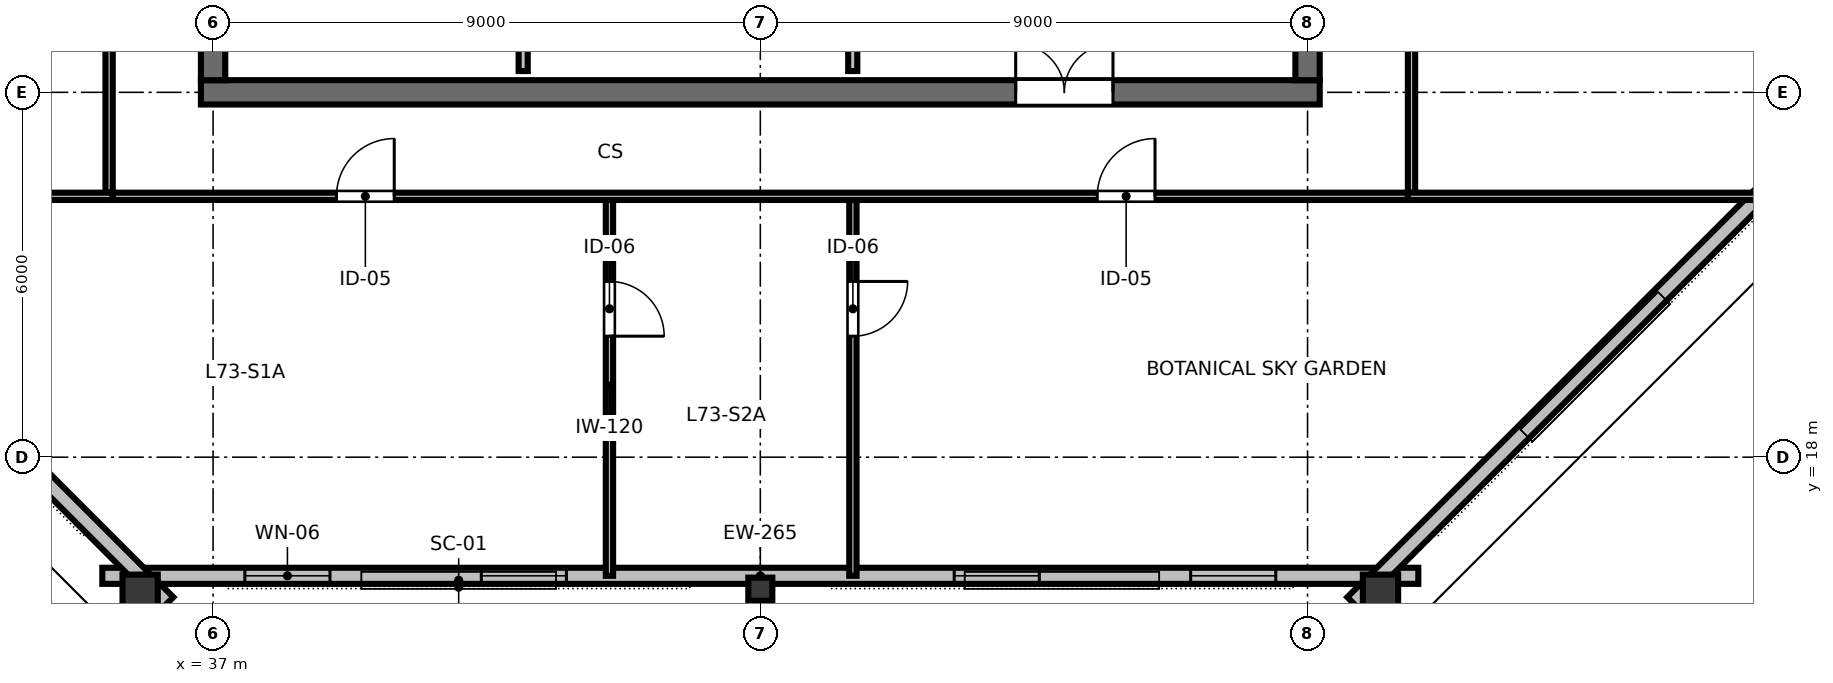
"""IFC4 building model, lengths in metres.
Left out: names, types, materials, properties, quantities, classifications, styles, units other than length and angle.
Written with IfcOpenShell. Run it as: python <this file> out.ifc"""

import sys

from ifc_helpers import new_model, si_unit, direction, frame, frame_2d, origin, origin_2d, place, context, subcontext, project, spatial, rectangle, hollow_rectangle, i_section, extrude, element, fill, save


model = new_model("IFC4")
c1 = context("Model", 3, precision=1e-05, world=origin(), true_north=direction((0.0, 1.0)))
c2 = subcontext(c1, "Body", "Model", "MODEL_VIEW")
j1 = project(units=[si_unit("LENGTHUNIT", "METRE"), si_unit("PLANEANGLEUNIT", "RADIAN")], contexts=[c1])
p1 = place(None, origin())
s1 = spatial("IfcSite", under=j1, at=p1, CompositionType="ELEMENT")
p2 = place(p1, origin())
s2 = spatial("IfcBuilding", under=s1, at=p2, CompositionType="ELEMENT")
p3 = place(p2, frame((0.0, 0.0, 275.4)))
s3 = spatial("IfcBuildingStorey", under=s2, at=p3, CompositionType="ELEMENT", Elevation=275.4)
p4 = place(p3, frame((36.8, 24.0, 0.0), z_axis=(0.0, 0.0, 1.0), x_axis=(1.0, 0.0, 0.0)))
e1 = element("IfcWall", 1, at=p4, inside=s3, PredefinedType="SHEAR", context=c2, shape_type="SweptSolid", body=[
    extrude(rectangle(XDim=18.4, YDim=0.4, at=frame_2d((9.2, 0.0))), origin(), (0.0, 0.0, 1.0), 3.28),
])
p5 = place(p4, frame((13.4, 0.0, 0.0)))
e2 = element("IfcOpeningElement", 2, at=p5, cuts=e1, PredefinedType="OPENING", context=c2, shape_type="SweptSolid", body=[
    extrude(rectangle(XDim=1.6, YDim=2.15, at=frame_2d((0.8, 1.075))), frame((0.0, 0.21, 0.0), z_axis=(0.0, -1.0, 0.0), x_axis=(1.0, 0.0, 0.0)), (0.0, 0.0, 1.0), 0.42),
])
p6 = place(p3, frame((37.0, 24.2, 0.0), z_axis=(0.0, 0.0, 1.0), x_axis=(0.0, 1.0, 0.0)))
e3 = element("IfcWall", 3, at=p6, inside=s3, PredefinedType="SHEAR", context=c2, shape_type="SweptSolid", body=[
    extrude(rectangle(XDim=15.6, YDim=0.4, at=frame_2d((7.8, 0.0))), origin(), (0.0, 0.0, 1.0), 3.28),
])
p7 = place(p6, frame((5.325, 0.0, 0.0)))
e4 = element("IfcOpeningElement", 4, at=p7, cuts=e3, PredefinedType="OPENING", context=c2, shape_type="SweptSolid", body=[
    extrude(rectangle(XDim=1.15, YDim=2.15, at=frame_2d((0.575, 1.075))), frame((0.0, 0.21, 0.0), z_axis=(0.0, -1.0, 0.0), x_axis=(1.0, 0.0, 0.0)), (0.0, 0.0, 1.0), 0.42),
])
p8 = place(p3, frame((55.0, 24.2, 0.0), z_axis=(0.0, 0.0, 1.0), x_axis=(0.0, 1.0, 0.0)))
e5 = element("IfcWall", 5, at=p8, inside=s3, PredefinedType="SHEAR", context=c2, shape_type="SweptSolid", body=[
    extrude(rectangle(XDim=15.6, YDim=0.4, at=frame_2d((7.8, 0.0))), origin(), (0.0, 0.0, 1.0), 3.28),
])
p9 = place(p8, frame((5.325, 0.0, 0.0)))
e6 = element("IfcOpeningElement", 6, at=p9, cuts=e5, PredefinedType="OPENING", context=c2, shape_type="SweptSolid", body=[
    extrude(rectangle(XDim=1.15, YDim=2.15, at=frame_2d((0.575, 1.075))), frame((0.0, 0.21, 0.0), z_axis=(0.0, -1.0, 0.0), x_axis=(1.0, 0.0, 0.0)), (0.0, 0.0, 1.0), 0.42),
])
p10 = place(p3, frame((35.8, 15.719, 0.0), z_axis=(0.143355432569, 0.089514056813, 0.985614759217), x_axis=(-0.529645364944, 0.848219185938, 0.0)))
e7 = element("IfcColumn", 7, at=p10, inside=s3, PredefinedType="COLUMN", context=c2, shape_type="SweptSolid", body=[
    extrude(hollow_rectangle(XDim=0.58, YDim=0.7, WallThickness=0.032, at=origin_2d()), origin(), (0.0, 0.0, 1.0), 3.306),
])
p11 = place(p3, frame((46.0, 15.829, 0.0), z_axis=(0.0, 0.088967639141, 0.996034517065), x_axis=(-1.0, 0.0, 0.0)))
e8 = element("IfcColumn", 8, at=p11, inside=s3, PredefinedType="COLUMN", context=c2, shape_type="SweptSolid", body=[
    extrude(i_section(OverallWidth=0.395, OverallDepth=0.38, WebThickness=0.019, FlangeThickness=0.03, FilletRadius=0.025, at=origin_2d()), origin(), (0.0, 0.0, 1.0), 3.271),
])
p12 = place(p3, frame((56.2, 15.719, 0.0), z_axis=(-0.143355432569, 0.089514056813, 0.985614759217), x_axis=(-0.529645364944, -0.848219185938, 0.0)))
e9 = element("IfcColumn", 9, at=p12, inside=s3, PredefinedType="COLUMN", context=c2, shape_type="SweptSolid", body=[
    extrude(hollow_rectangle(XDim=0.58, YDim=0.7, WallThickness=0.032, at=origin_2d()), origin(), (0.0, 0.0, 1.0), 3.306),
])
p13 = place(p3, frame((35.178, 16.049, 0.0), z_axis=(0.0, 0.0, 1.0), x_axis=(1.0, 0.0, 0.0)))
e10 = element("IfcWall", 10, at=p13, inside=s3, PredefinedType="STANDARD", context=c2, shape_type="SweptSolid", body=[
    extrude(rectangle(XDim=21.644, YDim=0.265, at=frame_2d((10.822, 0.0))), origin(), (0.0, 0.0, 1.0), 2.717),
])
p14 = place(p13, frame((2.344, 0.0, 0.85)))
e11 = element("IfcOpeningElement", 11, at=p14, cuts=e10, PredefinedType="OPENING", context=c2, shape_type="SweptSolid", body=[
    extrude(rectangle(XDim=1.4, YDim=1.2, at=frame_2d((0.7, 0.6))), frame((0.0, 0.142, 0.0), z_axis=(0.0, -1.0, 0.0), x_axis=(1.0, 0.0, 0.0)), (0.0, 0.0, 1.0), 0.285),
])
p15 = place(p13, frame((6.233, 0.0, 0.85)))
e12 = element("IfcOpeningElement", 12, at=p15, cuts=e10, PredefinedType="OPENING", context=c2, shape_type="SweptSolid", body=[
    extrude(rectangle(XDim=1.4, YDim=1.2, at=frame_2d((0.7, 0.6))), frame((0.0, 0.142, 0.0), z_axis=(0.0, -1.0, 0.0), x_axis=(1.0, 0.0, 0.0)), (0.0, 0.0, 1.0), 0.285),
])
p16 = place(p13, frame((14.01, 0.0, 0.85)))
e13 = element("IfcOpeningElement", 13, at=p16, cuts=e10, PredefinedType="OPENING", context=c2, shape_type="SweptSolid", body=[
    extrude(rectangle(XDim=1.4, YDim=1.2, at=frame_2d((0.7, 0.6))), frame((0.0, 0.142, 0.0), z_axis=(0.0, -1.0, 0.0), x_axis=(1.0, 0.0, 0.0)), (0.0, 0.0, 1.0), 0.285),
])
p17 = place(p13, frame((17.899, 0.0, 0.85)))
e14 = element("IfcOpeningElement", 14, at=p17, cuts=e10, PredefinedType="OPENING", context=c2, shape_type="SweptSolid", body=[
    extrude(rectangle(XDim=1.4, YDim=1.2, at=frame_2d((0.7, 0.6))), frame((0.0, 0.142, 0.0), z_axis=(0.0, -1.0, 0.0), x_axis=(1.0, 0.0, 0.0)), (0.0, 0.0, 1.0), 0.285),
])
for number, where, z_axis, x_axis in (
    (15, (55.747, 15.604, 0.0), (0.0, 0.0, 1.0), (0.707, 0.707, 0.0)),
    (16, (28.386, 23.471, 0.0), (0.0, 0.0, 1.0), (0.707, -0.707, 0.0)),
):
    element("IfcWall", number, at=place(p3, frame(where, z_axis=z_axis, x_axis=x_axis)), inside=s3, PredefinedType="STANDARD", context=c2, shape_type="SweptSolid", body=[
        extrude(rectangle(XDim=11.125, YDim=0.265, at=frame_2d((5.562, 0.0))), origin(), (0.0, 0.0, 1.0), 2.717),
    ])
p18 = place(p3, frame((42.1, 24.35, 0.0), z_axis=(0.0, 0.0, 1.0), x_axis=(0.0, 1.0, 0.0)))
e17 = element("IfcWall", 17, at=p18, inside=s3, PredefinedType="PARTITIONING", context=c2, shape_type="SweptSolid", body=[
    extrude(rectangle(XDim=3.9, YDim=0.15, at=frame_2d((1.95, 0.0))), origin(), (0.0, 0.0, 1.0), 3.26),
])
p19 = place(p18, frame((1.5, 0.0, 0.0)))
e18 = element("IfcOpeningElement", 18, at=p19, cuts=e17, PredefinedType="OPENING", context=c2, shape_type="SweptSolid", body=[
    extrude(rectangle(XDim=0.9, YDim=2.15, at=frame_2d((0.45, 1.075))), frame((0.0, 0.085, 0.0), z_axis=(0.0, -1.0, 0.0), x_axis=(1.0, 0.0, 0.0)), (0.0, 0.0, 1.0), 0.17),
])
p20 = place(p3, frame((47.52, 24.35, 0.0), z_axis=(0.0, 0.0, 1.0), x_axis=(0.0, 1.0, 0.0)))
e19 = element("IfcWall", 19, at=p20, inside=s3, PredefinedType="PARTITIONING", context=c2, shape_type="SweptSolid", body=[
    extrude(rectangle(XDim=3.9, YDim=0.15, at=frame_2d((1.95, 0.0))), origin(), (0.0, 0.0, 1.0), 3.26),
])
p21 = place(p20, frame((0.35, 0.0, 0.0)))
e20 = element("IfcOpeningElement", 20, at=p21, cuts=e19, PredefinedType="OPENING", context=c2, shape_type="SweptSolid", body=[
    extrude(rectangle(XDim=0.9, YDim=2.15, at=frame_2d((0.45, 1.075))), frame((0.0, 0.085, 0.0), z_axis=(0.0, -1.0, 0.0), x_axis=(1.0, 0.0, 0.0)), (0.0, 0.0, 1.0), 0.17),
])
p22 = place(p3, frame((43.519, 22.29, 0.0), z_axis=(0.0, 0.0, 1.0), x_axis=(0.0, -1.0, 0.0)))
e21 = element("IfcWall", 21, at=p22, inside=s3, PredefinedType="PARTITIONING", context=c2, shape_type="SweptSolid", body=[
    extrude(rectangle(XDim=6.241, YDim=0.12, at=frame_2d((3.121, 0.0))), origin(), (0.0, 0.0, 1.0), 2.54),
])
p23 = place(p22, frame((1.4, 0.0, 0.0)))
e22 = element("IfcOpeningElement", 22, at=p23, cuts=e21, PredefinedType="OPENING", context=c2, shape_type="SweptSolid", body=[
    extrude(rectangle(XDim=0.9, YDim=2.15, at=frame_2d((0.45, 1.075))), frame((0.0, 0.07, 0.0), z_axis=(0.0, -1.0, 0.0), x_axis=(1.0, 0.0, 0.0)), (0.0, 0.0, 1.0), 0.14),
])
p24 = place(p3, frame((47.523, 22.29, 0.0), z_axis=(0.0, 0.0, 1.0), x_axis=(0.0, -1.0, 0.0)))
e23 = element("IfcWall", 23, at=p24, inside=s3, PredefinedType="PARTITIONING", context=c2, shape_type="SweptSolid", body=[
    extrude(rectangle(XDim=6.241, YDim=0.12, at=frame_2d((3.121, 0.0))), origin(), (0.0, 0.0, 1.0), 2.54),
])
p25 = place(p24, frame((1.4, 0.0, 0.0)))
e24 = element("IfcOpeningElement", 24, at=p25, cuts=e23, PredefinedType="OPENING", context=c2, shape_type="SweptSolid", body=[
    extrude(rectangle(XDim=0.9, YDim=2.15, at=frame_2d((0.45, 1.075))), frame((0.0, 0.07, 0.0), z_axis=(0.0, -1.0, 0.0), x_axis=(1.0, 0.0, 0.0)), (0.0, 0.0, 1.0), 0.14),
])
p26 = place(p3, frame((35.35, 22.29, 0.0), z_axis=(0.0, 0.0, 1.0), x_axis=(1.0, 0.0, 0.0)))
e25 = element("IfcWall", 25, at=p26, inside=s3, PredefinedType="PARTITIONING", context=c2, shape_type="SweptSolid", body=[
    extrude(rectangle(XDim=21.3, YDim=0.12, at=frame_2d((10.65, 0.0))), origin(), (0.0, 0.0, 1.0), 2.54),
])
p27 = place(p26, frame((3.679, 0.0, 0.0)))
e26 = element("IfcOpeningElement", 26, at=p27, cuts=e25, PredefinedType="OPENING", context=c2, shape_type="SweptSolid", body=[
    extrude(rectangle(XDim=0.95, YDim=2.15, at=frame_2d((0.475, 1.075))), frame((0.0, 0.07, 0.0), z_axis=(0.0, -1.0, 0.0), x_axis=(1.0, 0.0, 0.0)), (0.0, 0.0, 1.0), 0.14),
])
p28 = place(p26, frame((16.191, 0.0, 0.0)))
e27 = element("IfcOpeningElement", 27, at=p28, cuts=e25, PredefinedType="OPENING", context=c2, shape_type="SweptSolid", body=[
    extrude(rectangle(XDim=0.95, YDim=2.15, at=frame_2d((0.475, 1.075))), frame((0.0, 0.07, 0.0), z_axis=(0.0, -1.0, 0.0), x_axis=(1.0, 0.0, 0.0)), (0.0, 0.0, 1.0), 0.14),
])
p29 = place(p3, frame((35.29, 22.35, 0.0), z_axis=(0.0, 0.0, 1.0), x_axis=(0.0, 1.0, 0.0)))
e28 = element("IfcWall", 28, at=p29, inside=s3, PredefinedType="PARTITIONING", context=c2, shape_type="SweptSolid", body=[
    extrude(rectangle(XDim=19.3, YDim=0.12, at=frame_2d((9.65, 0.0))), origin(), (0.0, 0.0, 1.0), 2.54),
])
p30 = place(p29, frame((4.201, 0.0, 0.0)))
e29 = element("IfcOpeningElement", 29, at=p30, cuts=e28, PredefinedType="OPENING", context=c2, shape_type="SweptSolid", body=[
    extrude(rectangle(XDim=0.95, YDim=2.15, at=frame_2d((0.475, 1.075))), frame((0.0, 0.07, 0.0), z_axis=(0.0, -1.0, 0.0), x_axis=(1.0, 0.0, 0.0)), (0.0, 0.0, 1.0), 0.14),
])
p31 = place(p29, frame((13.651, 0.0, 0.0)))
e30 = element("IfcOpeningElement", 30, at=p31, cuts=e28, PredefinedType="OPENING", context=c2, shape_type="SweptSolid", body=[
    extrude(rectangle(XDim=0.95, YDim=2.15, at=frame_2d((0.475, 1.075))), frame((0.0, 0.07, 0.0), z_axis=(0.0, -1.0, 0.0), x_axis=(1.0, 0.0, 0.0)), (0.0, 0.0, 1.0), 0.14),
])
p32 = place(p3, frame((56.71, 22.35, 0.0), z_axis=(0.0, 0.0, 1.0), x_axis=(0.0, 1.0, 0.0)))
e31 = element("IfcWall", 31, at=p32, inside=s3, PredefinedType="PARTITIONING", context=c2, shape_type="SweptSolid", body=[
    extrude(rectangle(XDim=19.3, YDim=0.12, at=frame_2d((9.65, 0.0))), origin(), (0.0, 0.0, 1.0), 2.54),
])
p33 = place(p32, frame((5.823, 0.0, 0.0)))
e32 = element("IfcOpeningElement", 32, at=p33, cuts=e31, PredefinedType="OPENING", context=c2, shape_type="SweptSolid", body=[
    extrude(rectangle(XDim=0.95, YDim=2.15, at=frame_2d((0.475, 1.075))), frame((0.0, 0.07, 0.0), z_axis=(0.0, -1.0, 0.0), x_axis=(1.0, 0.0, 0.0)), (0.0, 0.0, 1.0), 0.14),
])
p34 = place(p32, frame((15.272, 0.0, 0.0)))
e33 = element("IfcOpeningElement", 33, at=p34, cuts=e31, PredefinedType="OPENING", context=c2, shape_type="SweptSolid", body=[
    extrude(rectangle(XDim=0.95, YDim=2.15, at=frame_2d((0.475, 1.075))), frame((0.0, 0.07, 0.0), z_axis=(0.0, -1.0, 0.0), x_axis=(1.0, 0.0, 0.0)), (0.0, 0.0, 1.0), 0.14),
])
for number, where, z_axis, x_axis in (
    (34, (35.35, 22.29, 0.0), (0.0, 0.0, 1.0), (-1.0, 0.0, 0.0)),
    (35, (56.65, 22.29, 0.0), (0.0, 0.0, 1.0), (1.0, 0.0, 0.0)),
):
    element("IfcWall", number, at=place(p3, frame(where, z_axis=z_axis, x_axis=x_axis)), inside=s3, PredefinedType="PARTITIONING", context=c2, shape_type="SweptSolid", body=[
        extrude(rectangle(XDim=5.783, YDim=0.12, at=frame_2d((2.892, 0.0))), origin(), (0.0, 0.0, 1.0), 2.54),
    ])
p35 = place(p14, origin())
e36 = element("IfcWindow", 36, at=p35, inside=s3, PartitioningType="SINGLE_PANEL", PredefinedType="WINDOW", context=c2, shape_type="SweptSolid", body=[
    extrude(rectangle(XDim=1.4, YDim=1.2, at=frame_2d((0.7, 0.6))), frame((0.0, 0.03, 0.0), z_axis=(0.0, -1.0, 0.0), x_axis=(1.0, 0.0, 0.0)), (0.0, 0.0, 1.0), 0.06),
])
fill(e11, e36)
p36 = place(p15, origin())
e37 = element("IfcWindow", 37, at=p36, inside=s3, PartitioningType="SINGLE_PANEL", PredefinedType="WINDOW", context=c2, shape_type="SweptSolid", body=[
    extrude(rectangle(XDim=1.4, YDim=1.2, at=frame_2d((0.7, 0.6))), frame((0.0, 0.03, 0.0), z_axis=(0.0, -1.0, 0.0), x_axis=(1.0, 0.0, 0.0)), (0.0, 0.0, 1.0), 0.06),
])
fill(e12, e37)
p37 = place(p16, origin())
e38 = element("IfcWindow", 38, at=p37, inside=s3, PartitioningType="SINGLE_PANEL", PredefinedType="WINDOW", context=c2, shape_type="SweptSolid", body=[
    extrude(rectangle(XDim=1.4, YDim=1.2, at=frame_2d((0.7, 0.6))), frame((0.0, 0.03, 0.0), z_axis=(0.0, -1.0, 0.0), x_axis=(1.0, 0.0, 0.0)), (0.0, 0.0, 1.0), 0.06),
])
fill(e13, e38)
p38 = place(p17, origin())
e39 = element("IfcWindow", 39, at=p38, inside=s3, PartitioningType="SINGLE_PANEL", PredefinedType="WINDOW", context=c2, shape_type="SweptSolid", body=[
    extrude(rectangle(XDim=1.4, YDim=1.2, at=frame_2d((0.7, 0.6))), frame((0.0, 0.03, 0.0), z_axis=(0.0, -1.0, 0.0), x_axis=(1.0, 0.0, 0.0)), (0.0, 0.0, 1.0), 0.06),
])
fill(e14, e39)
p39 = place(p5, origin())
e40 = element("IfcDoor", 40, at=p39, inside=s3, OperationType="DOUBLE_DOOR_SINGLE_SWING", PredefinedType="DOOR", context=c2, shape_type="SweptSolid", body=[
    extrude(rectangle(XDim=1.6, YDim=2.15, at=frame_2d((0.8, 1.075))), frame((0.0, 0.025, 0.0), z_axis=(0.0, -1.0, 0.0), x_axis=(1.0, 0.0, 0.0)), (0.0, 0.0, 1.0), 0.05),
])
fill(e2, e40)
p40 = place(p23, origin())
e41 = element("IfcDoor", 41, at=p40, inside=s3, OperationType="SINGLE_SWING_RIGHT", PredefinedType="DOOR", context=c2, shape_type="SweptSolid", body=[
    extrude(rectangle(XDim=0.9, YDim=2.15, at=frame_2d((0.45, 1.075))), frame((0.0, 0.025, 0.0), z_axis=(0.0, -1.0, 0.0), x_axis=(1.0, 0.0, 0.0)), (0.0, 0.0, 1.0), 0.05),
])
fill(e22, e41)
p41 = place(p25, origin())
e42 = element("IfcDoor", 42, at=p41, inside=s3, OperationType="SINGLE_SWING_LEFT", PredefinedType="DOOR", context=c2, shape_type="SweptSolid", body=[
    extrude(rectangle(XDim=0.9, YDim=2.15, at=frame_2d((0.45, 1.075))), frame((0.0, 0.025, 0.0), z_axis=(0.0, -1.0, 0.0), x_axis=(1.0, 0.0, 0.0)), (0.0, 0.0, 1.0), 0.05),
])
fill(e24, e42)
p42 = place(p27, origin())
e43 = element("IfcDoor", 43, at=p42, inside=s3, OperationType="SINGLE_SWING_RIGHT", PredefinedType="DOOR", context=c2, shape_type="SweptSolid", body=[
    extrude(rectangle(XDim=0.95, YDim=2.15, at=frame_2d((0.475, 1.075))), frame((0.0, 0.025, 0.0), z_axis=(0.0, -1.0, 0.0), x_axis=(1.0, 0.0, 0.0)), (0.0, 0.0, 1.0), 0.05),
])
fill(e26, e43)
p43 = place(p28, origin())
e44 = element("IfcDoor", 44, at=p43, inside=s3, OperationType="SINGLE_SWING_RIGHT", PredefinedType="DOOR", context=c2, shape_type="SweptSolid", body=[
    extrude(rectangle(XDim=0.95, YDim=2.15, at=frame_2d((0.475, 1.075))), frame((0.0, 0.025, 0.0), z_axis=(0.0, -1.0, 0.0), x_axis=(1.0, 0.0, 0.0)), (0.0, 0.0, 1.0), 0.05),
])
fill(e27, e44)
save(model, sys.argv[1])
